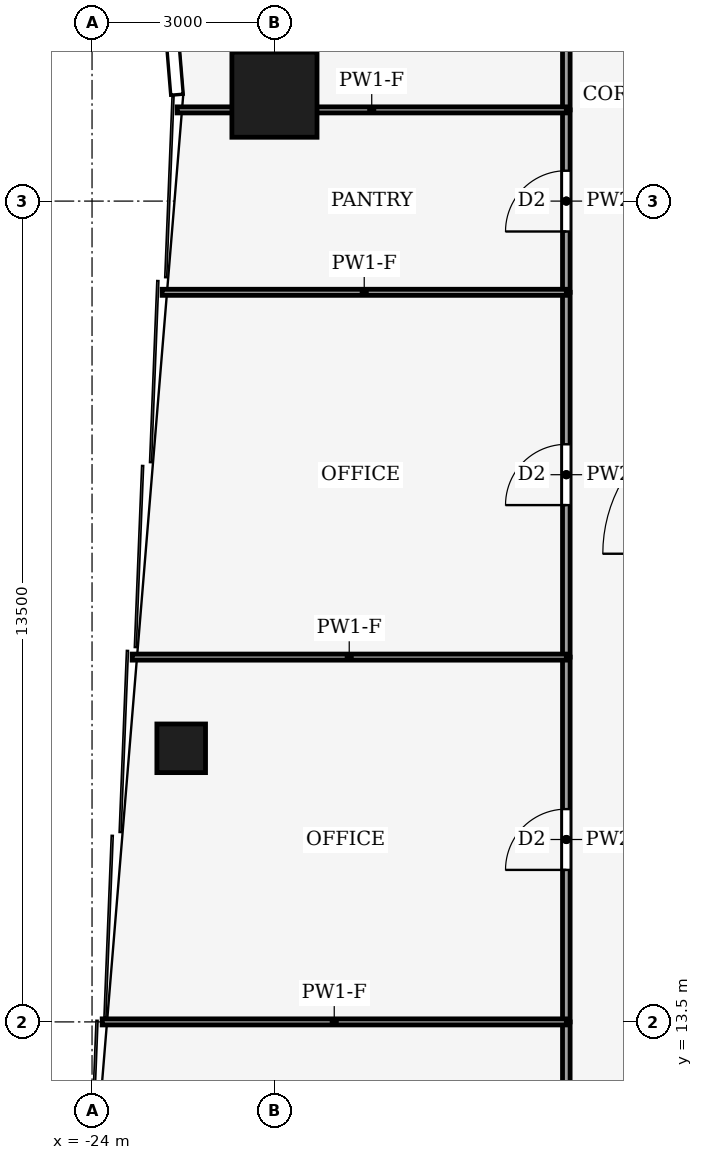
"""IFC4 building model, lengths in metres.
Left out: names, types, materials, properties, quantities, classifications, styles, units other than length and angle.
Written with IfcOpenShell. Run it as: python <this file> out.ifc"""

import sys

from ifc_helpers import new_model, si_unit, direction, frame, frame_2d, origin, origin_2d, place, context, subcontext, project, spatial, rectangle, hollow_rectangle, extrude, element, fill, save


model = new_model("IFC4")
c1 = context("Model", 3, precision=1e-05, world=origin(), true_north=direction((0.0, 1.0)))
c2 = subcontext(c1, "Body", "Model", "MODEL_VIEW")
j1 = project(units=[si_unit("LENGTHUNIT", "METRE"), si_unit("PLANEANGLEUNIT", "RADIAN")], contexts=[c1])
p1 = place(None, origin())
s1 = spatial("IfcSite", under=j1, at=p1, CompositionType="ELEMENT")
p2 = place(p1, origin())
s2 = spatial("IfcBuilding", under=s1, at=p2, CompositionType="ELEMENT")
p3 = place(p2, frame((0.0, 0.0, 74.0)))
s3 = spatial("IfcBuildingStorey", under=s2, at=p3, CompositionType="ELEMENT", Elevation=74.0)
p4 = place(p3, frame((-21.0, 28.75, 0.0), z_axis=(0.0, 0.0, 1.0), x_axis=(1.0, 0.0, 0.0)))
e1 = element("IfcColumn", 1, at=p4, inside=s3, PredefinedType="COLUMN", context=c2, shape_type="SweptSolid", body=[
    extrude(hollow_rectangle(XDim=1.4, YDim=1.4, WallThickness=0.08, at=origin_2d()), origin(), (0.0, 0.0, 1.0), 4.0),
])
p5 = place(p3, frame((-22.534, 18.0, 0.0), z_axis=(0.0, 0.0, 1.0), x_axis=(1.0, 0.0, 0.0)))
e2 = element("IfcColumn", 2, at=p5, inside=s3, PredefinedType="COLUMN", context=c2, shape_type="SweptSolid", body=[
    extrude(hollow_rectangle(XDim=0.8, YDim=0.8, WallThickness=0.04, at=origin_2d()), origin(), (0.0, 0.0, 1.0), 4.0),
])
p6 = place(p3, frame((-16.2, 4.57, 0.0), z_axis=(0.0, 0.0, 1.0), x_axis=(0.0, 1.0, 0.0)))
e3 = element("IfcWall", 3, at=p6, inside=s3, PredefinedType="PARTITIONING", context=c2, shape_type="SweptSolid", body=[
    extrude(rectangle(XDim=8.93, YDim=0.125, at=frame_2d((4.465, 0.0))), origin(), (0.0, 0.0, 1.0), 3.04),
])
p7 = place(p6, frame((4.03, 0.0, 0.0)))
e4 = element("IfcOpeningElement", 4, at=p7, cuts=e3, PredefinedType="OPENING", context=c2, shape_type="SweptSolid", body=[
    extrude(rectangle(XDim=1.0, YDim=2.1, at=frame_2d((0.5, 1.05))), frame((0.0, 0.073, 0.0), z_axis=(0.0, -1.0, 0.0), x_axis=(1.0, 0.0, 0.0)), (0.0, 0.0, 1.0), 0.145),
])
p8 = place(p3, frame((-16.2, 13.5, 0.0), z_axis=(0.0, 0.0, 1.0), x_axis=(0.0, 1.0, 0.0)))
e5 = element("IfcWall", 5, at=p8, inside=s3, PredefinedType="PARTITIONING", context=c2, shape_type="SweptSolid", body=[
    extrude(rectangle(XDim=6.0, YDim=0.125, at=frame_2d((3.0, 0.0))), origin(), (0.0, 0.0, 1.0), 3.14),
])
p9 = place(p8, frame((2.5, 0.0, 0.0)))
e6 = element("IfcOpeningElement", 6, at=p9, cuts=e5, PredefinedType="OPENING", context=c2, shape_type="SweptSolid", body=[
    extrude(rectangle(XDim=1.0, YDim=2.1, at=frame_2d((0.5, 1.05))), frame((0.0, 0.073, 0.0), z_axis=(0.0, -1.0, 0.0), x_axis=(1.0, 0.0, 0.0)), (0.0, 0.0, 1.0), 0.145),
])
p10 = place(p3, frame((-16.2, 19.5, 0.0), z_axis=(0.0, 0.0, 1.0), x_axis=(0.0, 1.0, 0.0)))
e7 = element("IfcWall", 7, at=p10, inside=s3, PredefinedType="PARTITIONING", context=c2, shape_type="SweptSolid", body=[
    extrude(rectangle(XDim=6.0, YDim=0.125, at=frame_2d((3.0, 0.0))), origin(), (0.0, 0.0, 1.0), 3.48),
])
p11 = place(p10, frame((2.5, 0.0, 0.0)))
e8 = element("IfcOpeningElement", 8, at=p11, cuts=e7, PredefinedType="OPENING", context=c2, shape_type="SweptSolid", body=[
    extrude(rectangle(XDim=1.0, YDim=2.1, at=frame_2d((0.5, 1.05))), frame((0.0, 0.073, 0.0), z_axis=(0.0, -1.0, 0.0), x_axis=(1.0, 0.0, 0.0)), (0.0, 0.0, 1.0), 0.145),
])
p12 = place(p3, frame((-16.2, 25.5, 0.0), z_axis=(0.0, 0.0, 1.0), x_axis=(0.0, 1.0, 0.0)))
e9 = element("IfcWall", 9, at=p12, inside=s3, PredefinedType="PARTITIONING", context=c2, shape_type="SweptSolid", body=[
    extrude(rectangle(XDim=3.0, YDim=0.125, at=frame_2d((1.5, 0.0))), origin(), (0.0, 0.0, 1.0), 3.48),
])
p13 = place(p12, frame((1.0, 0.0, 0.0)))
e10 = element("IfcOpeningElement", 10, at=p13, cuts=e9, PredefinedType="OPENING", context=c2, shape_type="SweptSolid", body=[
    extrude(rectangle(XDim=1.0, YDim=2.1, at=frame_2d((0.5, 1.05))), frame((0.0, 0.073, 0.0), z_axis=(0.0, -1.0, 0.0), x_axis=(1.0, 0.0, 0.0)), (0.0, 0.0, 1.0), 0.145),
])
p14 = place(p3, frame((-16.2, 28.5, 0.0), z_axis=(0.0, 0.0, 1.0), x_axis=(0.0, 1.0, 0.0)))
e11 = element("IfcWall", 11, at=p14, inside=s3, PredefinedType="PARTITIONING", context=c2, shape_type="SweptSolid", body=[
    extrude(rectangle(XDim=9.0, YDim=0.125, at=frame_2d((4.5, 0.0))), origin(), (0.0, 0.0, 1.0), 3.48),
])
p15 = place(p14, frame((4.0, 0.0, 0.0)))
e12 = element("IfcOpeningElement", 12, at=p15, cuts=e11, PredefinedType="OPENING", context=c2, shape_type="SweptSolid", body=[
    extrude(rectangle(XDim=1.0, YDim=2.1, at=frame_2d((0.5, 1.05))), frame((0.0, 0.073, 0.0), z_axis=(0.0, -1.0, 0.0), x_axis=(1.0, 0.0, 0.0)), (0.0, 0.0, 1.0), 0.145),
])
p16 = place(p3, frame((-16.2, 13.5, 0.0), z_axis=(0.0, 0.0, 1.0), x_axis=(-1.0, 0.0, 0.0)))
e13 = element("IfcWall", 13, at=p16, inside=s3, PredefinedType="PARTITIONING", context=c2, shape_type="SweptSolid", body=[
    extrude(rectangle(XDim=7.634, YDim=0.1, at=frame_2d((3.817, 0.0))), origin(), (0.0, 0.0, 1.0), 3.04),
])
p17 = place(p3, frame((-16.2, 19.5, 0.0), z_axis=(0.0, 0.0, 1.0), x_axis=(-1.0, 0.0, 0.0)))
e14 = element("IfcWall", 14, at=p17, inside=s3, PredefinedType="PARTITIONING", context=c2, shape_type="SweptSolid", body=[
    extrude(rectangle(XDim=7.14, YDim=0.1, at=frame_2d((3.57, 0.0))), origin(), (0.0, 0.0, 1.0), 3.04),
])
p18 = place(p3, frame((-16.2, 25.5, 0.0), z_axis=(0.0, 0.0, 1.0), x_axis=(-1.0, 0.0, 0.0)))
e15 = element("IfcWall", 15, at=p18, inside=s3, PredefinedType="PARTITIONING", context=c2, shape_type="SweptSolid", body=[
    extrude(rectangle(XDim=6.647, YDim=0.1, at=frame_2d((3.324, 0.0))), origin(), (0.0, 0.0, 1.0), 3.04),
])
p19 = place(p3, frame((-16.2, 28.5, 0.0), z_axis=(0.0, 0.0, 1.0), x_axis=(-1.0, 0.0, 0.0)))
e16 = element("IfcWall", 16, at=p19, inside=s3, PredefinedType="PARTITIONING", context=c2, shape_type="SweptSolid", body=[
    extrude(rectangle(XDim=6.401, YDim=0.1, at=frame_2d((3.2, 0.0))), origin(), (0.0, 0.0, 1.0), 3.04),
])
p20 = place(p9, origin())
e17 = element("IfcDoor", 17, at=p20, inside=s3, OperationType="SINGLE_SWING_RIGHT", PredefinedType="DOOR", context=c2, shape_type="SweptSolid", body=[
    extrude(rectangle(XDim=1.0, YDim=2.1, at=frame_2d((0.5, 1.05))), frame((0.0, 0.025, 0.0), z_axis=(0.0, -1.0, 0.0), x_axis=(1.0, 0.0, 0.0)), (0.0, 0.0, 1.0), 0.05),
])
fill(e6, e17)
p21 = place(p11, origin())
e18 = element("IfcDoor", 18, at=p21, inside=s3, OperationType="SINGLE_SWING_LEFT", PredefinedType="DOOR", context=c2, shape_type="SweptSolid", body=[
    extrude(rectangle(XDim=1.0, YDim=2.1, at=frame_2d((0.5, 1.05))), frame((0.0, 0.025, 0.0), z_axis=(0.0, -1.0, 0.0), x_axis=(1.0, 0.0, 0.0)), (0.0, 0.0, 1.0), 0.05),
])
fill(e8, e18)
p22 = place(p13, origin())
e19 = element("IfcDoor", 19, at=p22, inside=s3, OperationType="SINGLE_SWING_RIGHT", PredefinedType="DOOR", context=c2, shape_type="SweptSolid", body=[
    extrude(rectangle(XDim=1.0, YDim=2.1, at=frame_2d((0.5, 1.05))), frame((0.0, 0.025, 0.0), z_axis=(0.0, -1.0, 0.0), x_axis=(1.0, 0.0, 0.0)), (0.0, 0.0, 1.0), 0.05),
])
fill(e10, e19)
save(model, sys.argv[1])
